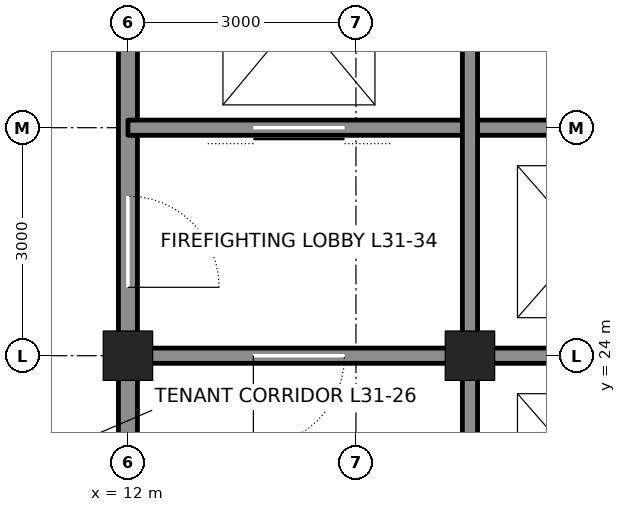
"""IFC4 building model, lengths in metres.
Left out: names, types, materials, properties, quantities, classifications, styles, units other than length and angle.
Written with IfcOpenShell. Run it as: python <this file> out.ifc"""

import sys

from ifc_helpers import new_model, si_unit, direction, frame, frame_2d, origin, origin_2d, place, context, subcontext, project, spatial, rectangle, hollow_rectangle, extrude, element, fill, save


model = new_model("IFC4")
c1 = context("Model", 3, precision=1e-05, world=origin(), true_north=direction((0.0, 1.0)))
c2 = subcontext(c1, "Body", "Model", "MODEL_VIEW")
j1 = project(units=[si_unit("LENGTHUNIT", "METRE"), si_unit("PLANEANGLEUNIT", "RADIAN")], contexts=[c1])
p1 = place(None, origin())
s1 = spatial("IfcSite", under=j1, at=p1, CompositionType="ELEMENT")
p2 = place(p1, origin())
s2 = spatial("IfcBuilding", under=s1, at=p2, CompositionType="ELEMENT")
p3 = place(p2, frame((0.0, 0.0, 144.6)))
s3 = spatial("IfcBuildingStorey", under=s2, at=p3, CompositionType="ELEMENT", Elevation=144.6)
for number, where, z_axis, x_axis in (
    (1, (12.0, 24.0, 0.0), (0.0, 0.0, 1.0), (1.0, 0.0, 0.0)),
    (2, (16.5, 24.0, 0.0), (0.0, 0.0, 1.0), (1.0, 0.0, 0.0)),
):
    element("IfcColumn", number, at=place(p3, frame(where, z_axis=z_axis, x_axis=x_axis)), inside=s3, PredefinedType="COLUMN", context=c2, shape_type="SweptSolid", body=[
        extrude(hollow_rectangle(XDim=0.65, YDim=0.65, WallThickness=0.065, at=origin_2d()), origin(), (0.0, 0.0, 1.0), 4.2),
    ])
p4 = place(p3, frame((12.0, 21.25, 0.0), z_axis=(0.0, 0.0, 1.0), x_axis=(0.0, 1.0, 0.0)))
e3 = element("IfcWall", 3, at=p4, inside=s3, PredefinedType="SOLIDWALL", context=c2, shape_type="SweptSolid", body=[
    extrude(rectangle(XDim=2.5, YDim=0.25, at=frame_2d((1.25, 0.0))), origin(), (0.0, 0.0, 1.0), 3.113),
])
p5 = place(p3, frame((12.0, 24.25, 0.0), z_axis=(0.0, 0.0, 1.0), x_axis=(0.0, 1.0, 0.0)))
e4 = element("IfcWall", 4, at=p5, inside=s3, PredefinedType="SOLIDWALL", context=c2, shape_type="SweptSolid", body=[
    extrude(rectangle(XDim=8.5, YDim=0.25, at=frame_2d((4.25, 0.0))), origin(), (0.0, 0.0, 1.0), 3.113),
])
p6 = place(p5, frame((0.65, 0.0, 0.0)))
e5 = element("IfcOpeningElement", 5, at=p6, cuts=e4, PredefinedType="OPENING", context=c2, shape_type="SweptSolid", body=[
    extrude(rectangle(XDim=1.2, YDim=2.1, at=frame_2d((0.6, 1.05))), frame((0.0, 0.135, 0.0), z_axis=(0.0, -1.0, 0.0), x_axis=(1.0, 0.0, 0.0)), (0.0, 0.0, 1.0), 0.27),
])
p7 = place(p5, frame((6.875, 0.0, 0.0)))
e6 = element("IfcOpeningElement", 6, at=p7, cuts=e4, PredefinedType="OPENING", context=c2, shape_type="SweptSolid", body=[
    extrude(rectangle(XDim=0.75, YDim=2.1, at=frame_2d((0.375, 1.05))), frame((0.0, 0.135, 0.0), z_axis=(0.0, -1.0, 0.0), x_axis=(1.0, 0.0, 0.0)), (0.0, 0.0, 1.0), 0.27),
])
p8 = place(p3, frame((12.25, 24.0, 0.0), z_axis=(0.0, 0.0, 1.0), x_axis=(1.0, 0.0, 0.0)))
e7 = element("IfcWall", 7, at=p8, inside=s3, PredefinedType="SOLIDWALL", context=c2, shape_type="SweptSolid", body=[
    extrude(rectangle(XDim=4.0, YDim=0.2, at=frame_2d((2.0, 0.0))), origin(), (0.0, 0.0, 1.0), 3.09),
])
p9 = place(p8, frame((1.4, 0.0, 0.0)))
e8 = element("IfcOpeningElement", 8, at=p9, cuts=e7, PredefinedType="OPENING", context=c2, shape_type="SweptSolid", body=[
    extrude(rectangle(XDim=1.2, YDim=2.1, at=frame_2d((0.6, 1.05))), frame((0.0, 0.11, 0.0), z_axis=(0.0, -1.0, 0.0), x_axis=(1.0, 0.0, 0.0)), (0.0, 0.0, 1.0), 0.22),
])
p10 = place(p3, frame((16.75, 24.0, 0.0), z_axis=(0.0, 0.0, 1.0), x_axis=(1.0, 0.0, 0.0)))
e9 = element("IfcWall", 9, at=p10, inside=s3, PredefinedType="SOLIDWALL", context=c2, shape_type="SweptSolid", body=[
    extrude(rectangle(XDim=2.75, YDim=0.2, at=frame_2d((1.375, 0.0))), origin(), (0.0, 0.0, 1.0), 3.09),
])
p11 = place(p3, frame((12.0, 27.0, 0.0), z_axis=(0.0, 0.0, 1.0), x_axis=(1.0, 0.0, 0.0)))
e10 = element("IfcWall", 10, at=p11, inside=s3, PredefinedType="SOLIDWALL", context=c2, shape_type="SweptSolid", body=[
    extrude(rectangle(XDim=7.5, YDim=0.2, at=frame_2d((3.75, 0.0))), origin(), (0.0, 0.0, 1.0), 4.04),
])
p12 = place(p11, frame((1.65, 0.0, 0.0)))
e11 = element("IfcOpeningElement", 11, at=p12, cuts=e10, PredefinedType="OPENING", context=c2, shape_type="SweptSolid", body=[
    extrude(rectangle(XDim=1.2, YDim=2.1, at=frame_2d((0.6, 1.05))), frame((0.0, 0.11, 0.0), z_axis=(0.0, -1.0, 0.0), x_axis=(1.0, 0.0, 0.0)), (0.0, 0.0, 1.0), 0.22),
])
p13 = place(p3, frame((16.5, 21.25, 0.0), z_axis=(0.0, 0.0, 1.0), x_axis=(0.0, 1.0, 0.0)))
e12 = element("IfcWall", 12, at=p13, inside=s3, PredefinedType="SOLIDWALL", context=c2, shape_type="SweptSolid", body=[
    extrude(rectangle(XDim=2.5, YDim=0.2, at=frame_2d((1.25, 0.0))), origin(), (0.0, 0.0, 1.0), 3.113),
])
p14 = place(p3, frame((16.5, 24.25, 0.0), z_axis=(0.0, 0.0, 1.0), x_axis=(0.0, 1.0, 0.0)))
e13 = element("IfcWall", 13, at=p14, inside=s3, PredefinedType="SOLIDWALL", context=c2, shape_type="SweptSolid", body=[
    extrude(rectangle(XDim=8.5, YDim=0.2, at=frame_2d((4.25, 0.0))), origin(), (0.0, 0.0, 1.0), 3.113),
])
p15 = place(p9, frame((1.2, 0.0, 0.0), z_axis=(0.0, 0.0, 1.0), x_axis=(-1.0, 0.0, 0.0)))
e14 = element("IfcDoor", 14, at=p15, inside=s3, OperationType="SINGLE_SWING_RIGHT", PredefinedType="DOOR", context=c2, shape_type="SweptSolid", body=[
    extrude(rectangle(XDim=1.2, YDim=2.1, at=frame_2d((0.6, 1.05))), frame((0.0, 0.025, 0.0), z_axis=(0.0, -1.0, 0.0), x_axis=(1.0, 0.0, 0.0)), (0.0, 0.0, 1.0), 0.05),
])
fill(e8, e14)
p16 = place(p6, frame((1.2, 0.0, 0.0), z_axis=(0.0, 0.0, 1.0), x_axis=(-1.0, 0.0, 0.0)))
e15 = element("IfcDoor", 15, at=p16, inside=s3, OperationType="SINGLE_SWING_RIGHT", PredefinedType="DOOR", context=c2, shape_type="SweptSolid", body=[
    extrude(rectangle(XDim=1.2, YDim=2.1, at=frame_2d((0.6, 1.05))), frame((0.0, 0.025, 0.0), z_axis=(0.0, -1.0, 0.0), x_axis=(1.0, 0.0, 0.0)), (0.0, 0.0, 1.0), 0.05),
])
fill(e5, e15)
p17 = place(p12, origin())
e16 = element("IfcDoor", 16, at=p17, inside=s3, OperationType="DOUBLE_DOOR_SLIDING", PredefinedType="DOOR", context=c2, shape_type="SweptSolid", body=[
    extrude(rectangle(XDim=1.2, YDim=2.1, at=frame_2d((0.6, 1.05))), frame((0.0, 0.025, 0.0), z_axis=(0.0, -1.0, 0.0), x_axis=(1.0, 0.0, 0.0)), (0.0, 0.0, 1.0), 0.05),
])
fill(e11, e16)
save(model, sys.argv[1])
